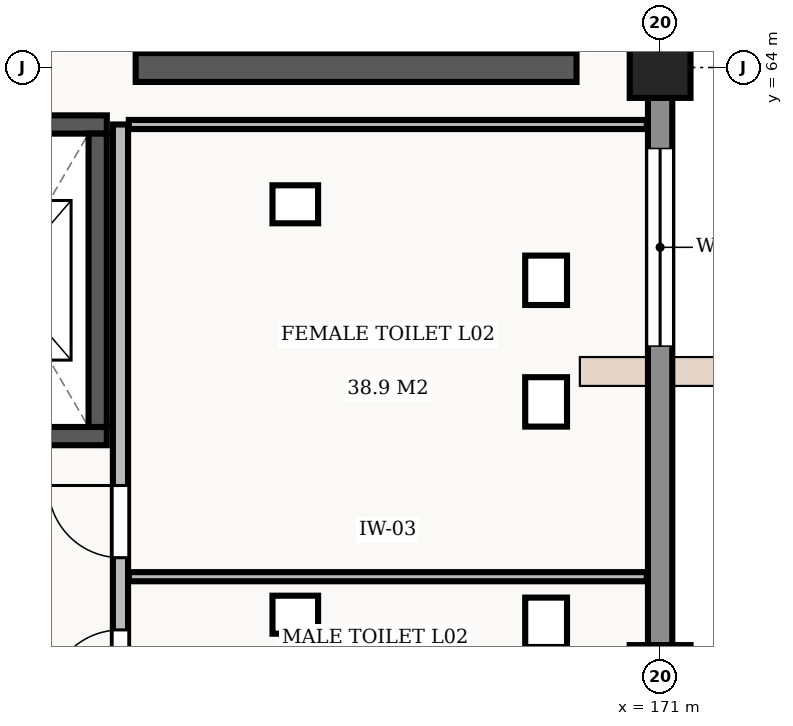
"""IFC4 building model, lengths in metres.
Left out: names, types, materials, properties, quantities, classifications, styles, units other than length and angle.
Written with IfcOpenShell. Run it as: python <this file> out.ifc"""

import sys

from ifc_helpers import new_model, si_unit, direction, frame, frame_2d, origin, origin_2d, place, context, subcontext, project, spatial, rectangle, extrude, element, fill, save


model = new_model("IFC4")
c1 = context("Model", 3, precision=1e-05, world=origin(), true_north=direction((0.0, 1.0)))
c2 = subcontext(c1, "Body", "Model", "MODEL_VIEW")
j1 = project(units=[si_unit("LENGTHUNIT", "METRE"), si_unit("PLANEANGLEUNIT", "RADIAN")], contexts=[c1])
p1 = place(None, origin())
s1 = spatial("IfcSite", under=j1, at=p1, CompositionType="ELEMENT")
p2 = place(p1, origin())
s2 = spatial("IfcBuilding", under=s1, at=p2, CompositionType="ELEMENT")
p3 = place(p2, frame((0.0, 0.0, 10.2)))
s3 = spatial("IfcBuildingStorey", under=s2, at=p3, CompositionType="ELEMENT", Elevation=10.2)
for number, where, z_axis, x_axis in (
    (1, (171.0, 56.0, 0.0), (0.0, 0.0, 1.0), (1.0, 0.0, 0.0)),
    (2, (171.0, 64.0, 0.0), (0.0, 0.0, 1.0), (1.0, 0.0, 0.0)),
):
    element("IfcColumn", number, at=place(p3, frame(where, z_axis=z_axis, x_axis=x_axis)), inside=s3, PredefinedType="COLUMN", context=c2, shape_type="SweptSolid", body=[
        extrude(rectangle(XDim=0.8, YDim=0.8, at=origin_2d()), origin(), (0.0, 0.0, 1.0), 4.2),
    ])
p4 = place(p3, frame((171.0, 63.602, 0.0), z_axis=(0.0, 0.0, 1.0), x_axis=(0.0, -1.0, 0.0)))
e3 = element("IfcWall", 3, at=p4, inside=s3, PredefinedType="STANDARD", context=c2, shape_type="SweptSolid", body=[
    extrude(rectangle(XDim=7.204, YDim=0.32, at=frame_2d((3.602, 0.0))), origin(), (0.0, 0.0, 1.0), 3.32),
])
p5 = place(p4, frame((0.668, 0.0, 0.9)))
e4 = element("IfcOpeningElement", 4, at=p5, cuts=e3, PredefinedType="OPENING", context=c2, shape_type="SweptSolid", body=[
    extrude(rectangle(XDim=2.6, YDim=1.6, at=frame_2d((1.3, 0.8))), frame((0.0, 0.172, 0.0), z_axis=(0.0, -1.0, 0.0), x_axis=(1.0, 0.0, 0.0)), (0.0, 0.0, 1.0), 0.344),
])
p6 = place(p3, frame((160.975, 59.15, 0.0), z_axis=(0.0, 0.0, 1.0), x_axis=(1.0, 0.0, 0.0)))
e5 = element("IfcWall", 5, at=p6, inside=s3, PredefinedType="SHEAR", context=c2, shape_type="SweptSolid", body=[
    extrude(rectangle(XDim=2.745, YDim=0.24, at=frame_2d((1.373, 0.0))), origin(), (0.0, 0.0, 1.0), 3.89),
])
p7 = place(p6, frame((0.825, 0.0, 0.0)))
e6 = element("IfcOpeningElement", 6, at=p7, cuts=e5, PredefinedType="OPENING", context=c2, shape_type="SweptSolid", body=[
    extrude(rectangle(XDim=1.1, YDim=2.2, at=frame_2d((0.55, 1.1))), frame((0.0, 0.132, 0.0), z_axis=(0.0, -1.0, 0.0), x_axis=(1.0, 0.0, 0.0)), (0.0, 0.0, 1.0), 0.264),
])
p8 = place(p3, frame((163.72, 63.25, 0.0), z_axis=(0.0, 0.0, 1.0), x_axis=(-1.0, 0.0, 0.0)))
e7 = element("IfcWall", 7, at=p8, inside=s3, PredefinedType="SHEAR", context=c2, shape_type="SweptSolid", body=[
    extrude(rectangle(XDim=2.745, YDim=0.24, at=frame_2d((1.373, 0.0))), origin(), (0.0, 0.0, 1.0), 3.89),
])
p9 = place(p3, frame((163.6, 59.27, 0.0), z_axis=(0.0, 0.0, 1.0), x_axis=(0.0, 1.0, 0.0)))
e8 = element("IfcWall", 8, at=p9, inside=s3, PredefinedType="SHEAR", context=c2, shape_type="SweptSolid", body=[
    extrude(rectangle(XDim=3.86, YDim=0.24, at=frame_2d((1.93, 0.0))), origin(), (0.0, 0.0, 1.0), 3.89),
])
p10 = place(p3, frame((164.1, 64.0, 0.0), z_axis=(0.0, 0.0, 1.0), x_axis=(1.0, 0.0, 0.0)))
e9 = element("IfcWall", 9, at=p10, inside=s3, PredefinedType="SHEAR", context=c2, shape_type="SweptSolid", body=[
    extrude(rectangle(XDim=5.8, YDim=0.38, at=frame_2d((2.9, 0.0))), origin(), (0.0, 0.0, 1.0), 2.94),
])
p11 = place(p3, frame((163.9, 52.95, 0.0), z_axis=(0.0, 0.0, 1.0), x_axis=(0.0, 1.0, 0.0)))
e10 = element("IfcWall", 10, at=p11, inside=s3, PredefinedType="STANDARD", context=c2, shape_type="SweptSolid", body=[
    extrude(rectangle(XDim=10.3, YDim=0.2, at=frame_2d((5.15, 0.0))), origin(), (0.0, 0.0, 1.0), 3.89),
])
p12 = place(p11, frame((0.55, 0.0, 0.0)))
e11 = element("IfcOpeningElement", 11, at=p12, cuts=e10, PredefinedType="OPENING", context=c2, shape_type="SweptSolid", body=[
    extrude(rectangle(XDim=1.0, YDim=2.1, at=frame_2d((0.5, 1.05))), frame((0.0, 0.112, 0.0), z_axis=(0.0, -1.0, 0.0), x_axis=(1.0, 0.0, 0.0)), (0.0, 0.0, 1.0), 0.224),
])
p13 = place(p11, frame((2.7, 0.0, 0.0)))
e12 = element("IfcOpeningElement", 12, at=p13, cuts=e10, PredefinedType="OPENING", context=c2, shape_type="SweptSolid", body=[
    extrude(rectangle(XDim=0.95, YDim=2.1, at=frame_2d((0.475, 1.05))), frame((0.0, 0.112, 0.0), z_axis=(0.0, -1.0, 0.0), x_axis=(1.0, 0.0, 0.0)), (0.0, 0.0, 1.0), 0.224),
])
p14 = place(p11, frame((4.6, 0.0, 0.0)))
e13 = element("IfcOpeningElement", 13, at=p14, cuts=e10, PredefinedType="OPENING", context=c2, shape_type="SweptSolid", body=[
    extrude(rectangle(XDim=0.95, YDim=2.1, at=frame_2d((0.475, 1.05))), frame((0.0, 0.112, 0.0), z_axis=(0.0, -1.0, 0.0), x_axis=(1.0, 0.0, 0.0)), (0.0, 0.0, 1.0), 0.224),
])
for number, where, z_axis, x_axis in (
    (14, (164.01, 57.3, 0.0), (0.0, 0.0, 1.0), (1.0, 0.0, 0.0)),
    (15, (164.01, 63.25, 0.0), (0.0, 0.0, 1.0), (1.0, 0.0, 0.0)),
):
    element("IfcWall", number, at=place(p3, frame(where, z_axis=z_axis, x_axis=x_axis)), inside=s3, PredefinedType="STANDARD", context=c2, shape_type="SweptSolid", body=[
        extrude(rectangle(XDim=6.815, YDim=0.12, at=frame_2d((3.407, 0.0))), origin(), (0.0, 0.0, 1.0), 3.89),
    ])
p15 = place(p5, origin())
e16 = element("IfcWindow", 16, at=p15, inside=s3, PartitioningType="SINGLE_PANEL", PredefinedType="WINDOW", context=c2, shape_type="SweptSolid", body=[
    extrude(rectangle(XDim=2.6, YDim=1.6, at=frame_2d((1.3, 0.8))), frame((0.0, 0.03, 0.0), z_axis=(0.0, -1.0, 0.0), x_axis=(1.0, 0.0, 0.0)), (0.0, 0.0, 1.0), 0.06),
])
fill(e4, e16)
p16 = place(p13, origin())
e17 = element("IfcDoor", 17, at=p16, inside=s3, OperationType="SINGLE_SWING_LEFT", PredefinedType="DOOR", context=c2, shape_type="SweptSolid", body=[
    extrude(rectangle(XDim=0.95, YDim=2.1, at=frame_2d((0.475, 1.05))), frame((0.0, 0.025, 0.0), z_axis=(0.0, -1.0, 0.0), x_axis=(1.0, 0.0, 0.0)), (0.0, 0.0, 1.0), 0.05),
])
fill(e12, e17)
p17 = place(p14, origin())
e18 = element("IfcDoor", 18, at=p17, inside=s3, OperationType="SINGLE_SWING_RIGHT", PredefinedType="DOOR", context=c2, shape_type="SweptSolid", body=[
    extrude(rectangle(XDim=0.95, YDim=2.1, at=frame_2d((0.475, 1.05))), frame((0.0, 0.025, 0.0), z_axis=(0.0, -1.0, 0.0), x_axis=(1.0, 0.0, 0.0)), (0.0, 0.0, 1.0), 0.05),
])
fill(e13, e18)
save(model, sys.argv[1])
